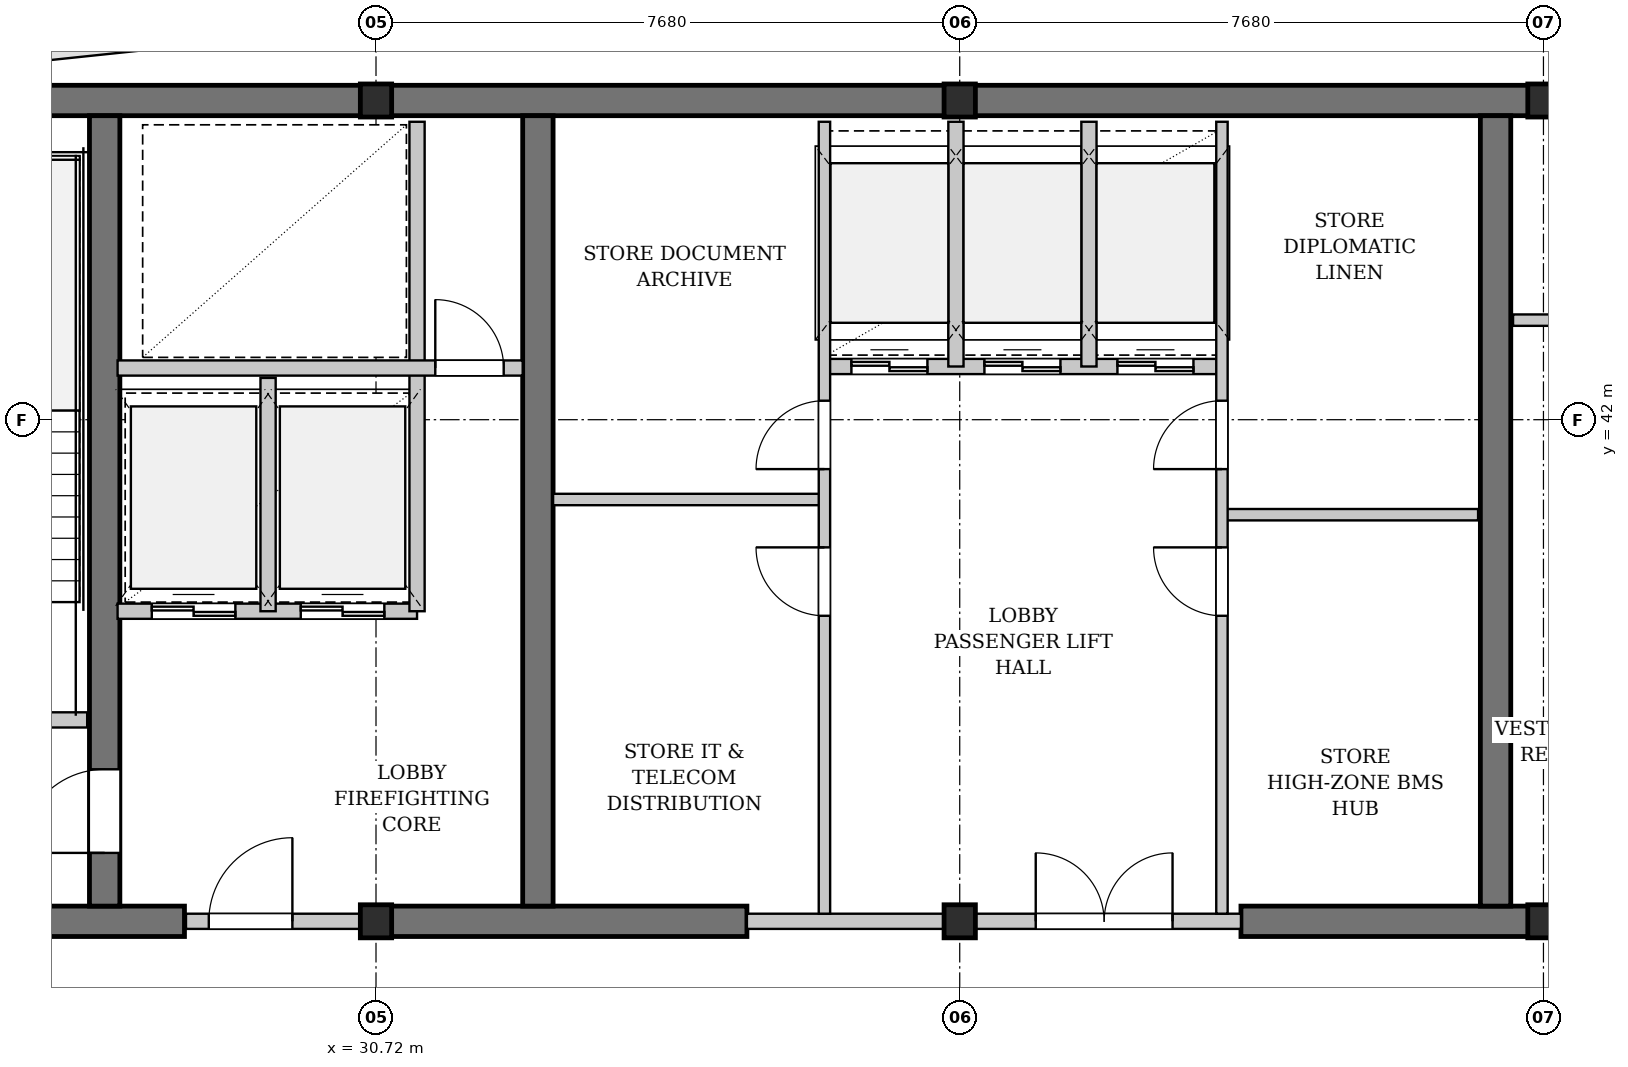
"""IFC4 building model, lengths in metres.
Left out: names, types, materials, properties, quantities, classifications, styles, units other than length and angle.
Written with IfcOpenShell. Run it as: python <this file> out.ifc"""

import sys

from ifc_helpers import new_model, si_unit, direction, frame, frame_2d, origin, origin_2d, place, context, subcontext, project, spatial, rectangle, i_section, extrude, element, fill, save


model = new_model("IFC4")
c1 = context("Model", 3, precision=1e-05, world=origin(), true_north=direction((0.0, 1.0)))
c2 = subcontext(c1, "Body", "Model", "MODEL_VIEW")
j1 = project(units=[si_unit("LENGTHUNIT", "METRE"), si_unit("PLANEANGLEUNIT", "RADIAN")], contexts=[c1])
p1 = place(None, origin())
s1 = spatial("IfcSite", under=j1, at=p1, CompositionType="ELEMENT")
p2 = place(p1, origin())
s2 = spatial("IfcBuilding", under=s1, at=p2, CompositionType="ELEMENT")
p3 = place(p2, frame((0.0, 0.0, 221.0)))
s3 = spatial("IfcBuildingStorey", under=s2, at=p3, CompositionType="ELEMENT", Elevation=221.0)
p4 = place(p3, frame((22.84, 46.2, 0.0), z_axis=(0.0, 0.0, 1.0), x_axis=(1.0, 0.0, 0.0)))
e1 = element("IfcWall", 1, at=p4, inside=s3, PredefinedType="SHEAR", context=c2, shape_type="SweptSolid", body=[
    extrude(rectangle(XDim=31.12, YDim=0.4, at=frame_2d((15.56, 0.0))), origin(), (0.0, 0.0, 1.0), 3.08),
])
p5 = place(p3, frame((22.84, 35.4, 0.0), z_axis=(0.0, 0.0, 1.0), x_axis=(1.0, 0.0, 0.0)))
e2 = element("IfcWall", 2, at=p5, inside=s3, PredefinedType="SHEAR", context=c2, shape_type="SweptSolid", body=[
    extrude(rectangle(XDim=5.36, YDim=0.4, at=frame_2d((2.68, 0.0))), origin(), (0.0, 0.0, 1.0), 3.08),
])
p6 = place(p3, frame((30.72, 35.4, 0.0), z_axis=(0.0, 0.0, 1.0), x_axis=(1.0, 0.0, 0.0)))
e3 = element("IfcWall", 3, at=p6, inside=s3, PredefinedType="SHEAR", context=c2, shape_type="SweptSolid", body=[
    extrude(rectangle(XDim=4.88, YDim=0.4, at=frame_2d((2.44, 0.0))), origin(), (0.0, 0.0, 1.0), 3.08),
])
p7 = place(p3, frame((42.1, 35.4, 0.0), z_axis=(0.0, 0.0, 1.0), x_axis=(1.0, 0.0, 0.0)))
e4 = element("IfcWall", 4, at=p7, inside=s3, PredefinedType="SHEAR", context=c2, shape_type="SweptSolid", body=[
    extrude(rectangle(XDim=8.05, YDim=0.4, at=frame_2d((4.025, 0.0))), origin(), (0.0, 0.0, 1.0), 3.08),
])
p8 = place(p7, frame((4.85, 0.0, 0.0)))
e5 = element("IfcOpeningElement", 5, at=p8, cuts=e4, PredefinedType="OPENING", context=c2, shape_type="SweptSolid", body=[
    extrude(rectangle(XDim=0.9, YDim=2.15, at=frame_2d((0.45, 1.075))), frame((0.0, 0.21, 0.0), z_axis=(0.0, -1.0, 0.0), x_axis=(1.0, 0.0, 0.0)), (0.0, 0.0, 1.0), 0.42),
])
p9 = place(p3, frame((27.15, 35.6, 0.0), z_axis=(0.0, 0.0, 1.0), x_axis=(0.0, 1.0, 0.0)))
e6 = element("IfcWall", 6, at=p9, inside=s3, PredefinedType="SHEAR", context=c2, shape_type="SweptSolid", body=[
    extrude(rectangle(XDim=10.4, YDim=0.4, at=frame_2d((5.2, 0.0))), origin(), (0.0, 0.0, 1.0), 3.08),
])
p10 = place(p9, frame((0.7, 0.0, 0.0)))
e7 = element("IfcOpeningElement", 7, at=p10, cuts=e6, PredefinedType="OPENING", context=c2, shape_type="SweptSolid", body=[
    extrude(rectangle(XDim=1.1, YDim=2.15, at=frame_2d((0.55, 1.075))), frame((0.0, 0.21, 0.0), z_axis=(0.0, -1.0, 0.0), x_axis=(1.0, 0.0, 0.0)), (0.0, 0.0, 1.0), 0.42),
])
for number, where, z_axis, x_axis in (
    (8, (32.85, 35.6, 0.0), (0.0, 0.0, 1.0), (0.0, 1.0, 0.0)),
    (9, (45.45, 35.6, 0.0), (0.0, 0.0, 1.0), (0.0, 1.0, 0.0)),
):
    element("IfcWall", number, at=place(p3, frame(where, z_axis=z_axis, x_axis=x_axis)), inside=s3, PredefinedType="SHEAR", context=c2, shape_type="SweptSolid", body=[
        extrude(rectangle(XDim=10.4, YDim=0.4, at=frame_2d((5.2, 0.0))), origin(), (0.0, 0.0, 1.0), 3.08),
    ])
for number, where, z_axis, x_axis in (
    (10, (30.72, 35.4, 0.0), (0.0, 0.0, 1.0), (1.0, 0.0, 0.0)),
    (11, (30.72, 46.2, 0.0), (0.0, 0.0, 1.0), (1.0, 0.0, 0.0)),
    (12, (38.4, 35.4, 0.0), (0.0, 0.0, 1.0), (1.0, 0.0, 0.0)),
    (13, (38.4, 46.2, 0.0), (0.0, 0.0, 1.0), (1.0, 0.0, 0.0)),
    (14, (46.08, 35.4, 0.0), (0.0, 0.0, 1.0), (1.0, 0.0, 0.0)),
    (15, (46.08, 46.2, 0.0), (0.0, 0.0, 1.0), (1.0, 0.0, 0.0)),
):
    element("IfcColumn", number, at=place(p3, frame(where, z_axis=z_axis, x_axis=x_axis)), inside=s3, PredefinedType="COLUMN", context=c2, shape_type="SweptSolid", body=[
        extrude(i_section(OverallWidth=0.412, OverallDepth=0.435, WebThickness=0.036, FlangeThickness=0.058, FilletRadius=0.015, at=origin_2d()), origin(), (0.0, 0.0, 1.0), 3.3),
    ])
p11 = place(p3, frame((23.3, 38.05, 0.0), z_axis=(0.0, 0.0, 1.0), x_axis=(1.0, 0.0, 0.0)))
e16 = element("IfcWall", 16, at=p11, inside=s3, PredefinedType="PARTITIONING", context=c2, shape_type="SweptSolid", body=[
    extrude(rectangle(XDim=3.62, YDim=0.2, at=frame_2d((1.81, 0.0))), origin(), (0.0, 0.0, 1.0), 3.08),
])
p12 = place(p11, frame((1.26, 0.0, 0.0)))
e17 = element("IfcOpeningElement", 17, at=p12, cuts=e16, PredefinedType="OPENING", context=c2, shape_type="SweptSolid", body=[
    extrude(rectangle(XDim=1.1, YDim=2.15, at=frame_2d((0.55, 1.075))), frame((0.0, 0.11, 0.0), z_axis=(0.0, -1.0, 0.0), x_axis=(1.0, 0.0, 0.0)), (0.0, 0.0, 1.0), 0.22),
])
p13 = place(p3, frame((28.22, 35.4, 0.0), z_axis=(0.0, 0.0, 1.0), x_axis=(1.0, 0.0, 0.0)))
e18 = element("IfcWall", 18, at=p13, inside=s3, PredefinedType="PARTITIONING", context=c2, shape_type="SweptSolid", body=[
    extrude(rectangle(XDim=2.5, YDim=0.2, at=frame_2d((1.25, 0.0))), origin(), (0.0, 0.0, 1.0), 2.313),
])
p14 = place(p13, frame((0.3, 0.0, 0.0)))
e19 = element("IfcOpeningElement", 19, at=p14, cuts=e18, PredefinedType="OPENING", context=c2, shape_type="SweptSolid", body=[
    extrude(rectangle(XDim=1.1, YDim=2.15, at=frame_2d((0.55, 1.075))), frame((0.0, 0.11, 0.0), z_axis=(0.0, -1.0, 0.0), x_axis=(1.0, 0.0, 0.0)), (0.0, 0.0, 1.0), 0.22),
])
p15 = place(p3, frame((27.32, 39.48, 0.0), z_axis=(0.0, 0.0, 1.0), x_axis=(1.0, 0.0, 0.0)))
e20 = element("IfcWall", 20, at=p15, inside=s3, PredefinedType="PARTITIONING", context=c2, shape_type="SweptSolid", body=[
    extrude(rectangle(XDim=3.94, YDim=0.2, at=frame_2d((1.97, 0.0))), origin(), (0.0, 0.0, 1.0), 3.08),
])
p16 = place(p15, frame((0.45, 0.0, 0.0)))
e21 = element("IfcOpeningElement", 21, at=p16, cuts=e20, PredefinedType="OPENING", context=c2, shape_type="SweptSolid", body=[
    extrude(rectangle(XDim=1.1, YDim=2.2, at=frame_2d((0.55, 1.1))), frame((0.0, 0.11, 0.0), z_axis=(0.0, -1.0, 0.0), x_axis=(1.0, 0.0, 0.0)), (0.0, 0.0, 1.0), 0.22),
])
p17 = place(p15, frame((2.41, 0.0, 0.0)))
e22 = element("IfcOpeningElement", 22, at=p17, cuts=e20, PredefinedType="OPENING", context=c2, shape_type="SweptSolid", body=[
    extrude(rectangle(XDim=1.1, YDim=2.2, at=frame_2d((0.55, 1.1))), frame((0.0, 0.11, 0.0), z_axis=(0.0, -1.0, 0.0), x_axis=(1.0, 0.0, 0.0)), (0.0, 0.0, 1.0), 0.22),
])
p18 = place(p3, frame((29.3, 39.48, 0.0), z_axis=(0.0, 0.0, 1.0), x_axis=(0.0, 1.0, 0.0)))
e23 = element("IfcWall", 23, at=p18, inside=s3, PredefinedType="PARTITIONING", context=c2, shape_type="SweptSolid", body=[
    extrude(rectangle(XDim=3.07, YDim=0.2, at=frame_2d((1.535, 0.0))), origin(), (0.0, 0.0, 1.0), 3.08),
])
p19 = place(p3, frame((31.26, 39.48, 0.0), z_axis=(0.0, 0.0, 1.0), x_axis=(0.0, 1.0, 0.0)))
e24 = element("IfcWall", 24, at=p19, inside=s3, PredefinedType="PARTITIONING", context=c2, shape_type="SweptSolid", body=[
    extrude(rectangle(XDim=6.44, YDim=0.2, at=frame_2d((3.22, 0.0))), origin(), (0.0, 0.0, 1.0), 3.08),
])
p20 = place(p3, frame((27.32, 42.68, 0.0), z_axis=(0.0, 0.0, 1.0), x_axis=(1.0, 0.0, 0.0)))
e25 = element("IfcWall", 25, at=p20, inside=s3, PredefinedType="PARTITIONING", context=c2, shape_type="SweptSolid", body=[
    extrude(rectangle(XDim=5.33, YDim=0.2, at=frame_2d((2.665, 0.0))), origin(), (0.0, 0.0, 1.0), 3.08),
])
p21 = place(p20, frame((4.18, 0.0, 0.0)))
e26 = element("IfcOpeningElement", 26, at=p21, cuts=e25, PredefinedType="OPENING", context=c2, shape_type="SweptSolid", body=[
    extrude(rectangle(XDim=0.9, YDim=2.15, at=frame_2d((0.45, 1.075))), frame((0.0, 0.11, 0.0), z_axis=(0.0, -1.0, 0.0), x_axis=(1.0, 0.0, 0.0)), (0.0, 0.0, 1.0), 0.22),
])
p22 = place(p3, frame((35.6, 35.4, 0.0), z_axis=(0.0, 0.0, 1.0), x_axis=(1.0, 0.0, 0.0)))
e27 = element("IfcWall", 27, at=p22, inside=s3, PredefinedType="PARTITIONING", context=c2, shape_type="SweptSolid", body=[
    extrude(rectangle(XDim=6.5, YDim=0.2, at=frame_2d((3.25, 0.0))), origin(), (0.0, 0.0, 1.0), 2.313),
])
p23 = place(p22, frame((3.8, 0.0, 0.0)))
e28 = element("IfcOpeningElement", 28, at=p23, cuts=e27, PredefinedType="OPENING", context=c2, shape_type="SweptSolid", body=[
    extrude(rectangle(XDim=1.8, YDim=2.3, at=frame_2d((0.9, 1.15))), frame((0.0, 0.11, 0.0), z_axis=(0.0, -1.0, 0.0), x_axis=(1.0, 0.0, 0.0)), (0.0, 0.0, 1.0), 0.22),
])
p24 = place(p3, frame((36.6, 42.7, 0.0), z_axis=(0.0, 0.0, 1.0), x_axis=(1.0, 0.0, 0.0)))
e29 = element("IfcWall", 29, at=p24, inside=s3, PredefinedType="PARTITIONING", context=c2, shape_type="SweptSolid", body=[
    extrude(rectangle(XDim=5.25, YDim=0.2, at=frame_2d((2.625, 0.0))), origin(), (0.0, 0.0, 1.0), 3.08),
])
p25 = place(p24, frame((0.375, 0.0, 0.0)))
e30 = element("IfcOpeningElement", 30, at=p25, cuts=e29, PredefinedType="OPENING", context=c2, shape_type="SweptSolid", body=[
    extrude(rectangle(XDim=1.0, YDim=2.2, at=frame_2d((0.5, 1.1))), frame((0.0, 0.11, 0.0), z_axis=(0.0, -1.0, 0.0), x_axis=(1.0, 0.0, 0.0)), (0.0, 0.0, 1.0), 0.22),
])
p26 = place(p24, frame((2.125, 0.0, 0.0)))
e31 = element("IfcOpeningElement", 31, at=p26, cuts=e29, PredefinedType="OPENING", context=c2, shape_type="SweptSolid", body=[
    extrude(rectangle(XDim=1.0, YDim=2.2, at=frame_2d((0.5, 1.1))), frame((0.0, 0.11, 0.0), z_axis=(0.0, -1.0, 0.0), x_axis=(1.0, 0.0, 0.0)), (0.0, 0.0, 1.0), 0.22),
])
p27 = place(p24, frame((3.875, 0.0, 0.0)))
e32 = element("IfcOpeningElement", 32, at=p27, cuts=e29, PredefinedType="OPENING", context=c2, shape_type="SweptSolid", body=[
    extrude(rectangle(XDim=1.0, YDim=2.2, at=frame_2d((0.5, 1.1))), frame((0.0, 0.11, 0.0), z_axis=(0.0, -1.0, 0.0), x_axis=(1.0, 0.0, 0.0)), (0.0, 0.0, 1.0), 0.22),
])
p28 = place(p3, frame((38.35, 42.7, 0.0), z_axis=(0.0, 0.0, 1.0), x_axis=(0.0, 1.0, 0.0)))
e33 = element("IfcWall", 33, at=p28, inside=s3, PredefinedType="PARTITIONING", context=c2, shape_type="SweptSolid", body=[
    extrude(rectangle(XDim=3.22, YDim=0.2, at=frame_2d((1.61, 0.0))), origin(), (0.0, 0.0, 1.0), 2.313),
])
p29 = place(p3, frame((40.1, 42.7, 0.0), z_axis=(0.0, 0.0, 1.0), x_axis=(0.0, 1.0, 0.0)))
e34 = element("IfcWall", 34, at=p29, inside=s3, PredefinedType="PARTITIONING", context=c2, shape_type="SweptSolid", body=[
    extrude(rectangle(XDim=3.22, YDim=0.2, at=frame_2d((1.61, 0.0))), origin(), (0.0, 0.0, 1.0), 3.08),
])
p30 = place(p3, frame((33.05, 40.95, 0.0), z_axis=(0.0, 0.0, 1.0), x_axis=(1.0, 0.0, 0.0)))
e35 = element("IfcWall", 35, at=p30, inside=s3, PredefinedType="PARTITIONING", context=c2, shape_type="SweptSolid", body=[
    extrude(rectangle(XDim=3.57, YDim=0.15, at=frame_2d((1.785, 0.0))), origin(), (0.0, 0.0, 1.0), 3.08),
])
p31 = place(p3, frame((36.62, 35.5, 0.0), z_axis=(0.0, 0.0, 1.0), x_axis=(0.0, 1.0, 0.0)))
e36 = element("IfcWall", 36, at=p31, inside=s3, PredefinedType="PARTITIONING", context=c2, shape_type="SweptSolid", body=[
    extrude(rectangle(XDim=10.42, YDim=0.15, at=frame_2d((5.21, 0.0))), origin(), (0.0, 0.0, 1.0), 3.08),
])
p32 = place(p31, frame((3.92, 0.0, 0.0)))
e37 = element("IfcOpeningElement", 37, at=p32, cuts=e36, PredefinedType="OPENING", context=c2, shape_type="SweptSolid", body=[
    extrude(rectangle(XDim=0.9, YDim=2.15, at=frame_2d((0.45, 1.075))), frame((0.0, 0.085, 0.0), z_axis=(0.0, -1.0, 0.0), x_axis=(1.0, 0.0, 0.0)), (0.0, 0.0, 1.0), 0.17),
])
p33 = place(p31, frame((5.85, 0.0, 0.0)))
e38 = element("IfcOpeningElement", 38, at=p33, cuts=e36, PredefinedType="OPENING", context=c2, shape_type="SweptSolid", body=[
    extrude(rectangle(XDim=0.9, YDim=2.15, at=frame_2d((0.45, 1.075))), frame((0.0, 0.085, 0.0), z_axis=(0.0, -1.0, 0.0), x_axis=(1.0, 0.0, 0.0)), (0.0, 0.0, 1.0), 0.17),
])
p34 = place(p3, frame((41.85, 40.75, 0.0), z_axis=(0.0, 0.0, 1.0), x_axis=(1.0, 0.0, 0.0)))
e39 = element("IfcWall", 39, at=p34, inside=s3, PredefinedType="PARTITIONING", context=c2, shape_type="SweptSolid", body=[
    extrude(rectangle(XDim=3.37, YDim=0.15, at=frame_2d((1.685, 0.0))), origin(), (0.0, 0.0, 1.0), 3.08),
])
p35 = place(p3, frame((41.85, 35.5, 0.0), z_axis=(0.0, 0.0, 1.0), x_axis=(0.0, 1.0, 0.0)))
e40 = element("IfcWall", 40, at=p35, inside=s3, PredefinedType="PARTITIONING", context=c2, shape_type="SweptSolid", body=[
    extrude(rectangle(XDim=10.42, YDim=0.15, at=frame_2d((5.21, 0.0))), origin(), (0.0, 0.0, 1.0), 3.08),
])
p36 = place(p35, frame((3.92, 0.0, 0.0)))
e41 = element("IfcOpeningElement", 41, at=p36, cuts=e40, PredefinedType="OPENING", context=c2, shape_type="SweptSolid", body=[
    extrude(rectangle(XDim=0.9, YDim=2.15, at=frame_2d((0.45, 1.075))), frame((0.0, 0.085, 0.0), z_axis=(0.0, -1.0, 0.0), x_axis=(1.0, 0.0, 0.0)), (0.0, 0.0, 1.0), 0.17),
])
p37 = place(p35, frame((5.85, 0.0, 0.0)))
e42 = element("IfcOpeningElement", 42, at=p37, cuts=e40, PredefinedType="OPENING", context=c2, shape_type="SweptSolid", body=[
    extrude(rectangle(XDim=0.9, YDim=2.15, at=frame_2d((0.45, 1.075))), frame((0.0, 0.085, 0.0), z_axis=(0.0, -1.0, 0.0), x_axis=(1.0, 0.0, 0.0)), (0.0, 0.0, 1.0), 0.17),
])
p38 = place(p3, frame((45.68, 43.31, 0.0), z_axis=(0.0, 0.0, 1.0), x_axis=(1.0, 0.0, 0.0)))
e43 = element("IfcWall", 43, at=p38, inside=s3, PredefinedType="PARTITIONING", context=c2, shape_type="SweptSolid", body=[
    extrude(rectangle(XDim=2.2, YDim=0.15, at=frame_2d((1.1, 0.0))), origin(), (0.0, 0.0, 1.0), 3.08),
])
p39 = place(p38, frame((0.65, 0.0, 0.0)))
e44 = element("IfcOpeningElement", 44, at=p39, cuts=e43, PredefinedType="OPENING", context=c2, shape_type="SweptSolid", body=[
    extrude(rectangle(XDim=0.9, YDim=2.15, at=frame_2d((0.45, 1.075))), frame((0.0, 0.085, 0.0), z_axis=(0.0, -1.0, 0.0), x_axis=(1.0, 0.0, 0.0)), (0.0, 0.0, 1.0), 0.17),
])
p40 = place(p14, origin())
e45 = element("IfcDoor", 45, at=p40, inside=s3, OperationType="SINGLE_SWING_RIGHT", PredefinedType="DOOR", context=c2, shape_type="SweptSolid", body=[
    extrude(rectangle(XDim=1.1, YDim=2.15, at=frame_2d((0.55, 1.075))), frame((0.0, 0.025, 0.0), z_axis=(0.0, -1.0, 0.0), x_axis=(1.0, 0.0, 0.0)), (0.0, 0.0, 1.0), 0.05),
])
fill(e19, e45)
p41 = place(p16, origin())
e46 = element("IfcDoor", 46, at=p41, inside=s3, OperationType="DOUBLE_DOOR_SLIDING", PredefinedType="DOOR", context=c2, shape_type="SweptSolid", body=[
    extrude(rectangle(XDim=1.1, YDim=2.2, at=frame_2d((0.55, 1.1))), frame((0.0, 0.025, 0.0), z_axis=(0.0, -1.0, 0.0), x_axis=(1.0, 0.0, 0.0)), (0.0, 0.0, 1.0), 0.05),
])
fill(e21, e46)
p42 = place(p17, origin())
e47 = element("IfcDoor", 47, at=p42, inside=s3, OperationType="DOUBLE_DOOR_SLIDING", PredefinedType="DOOR", context=c2, shape_type="SweptSolid", body=[
    extrude(rectangle(XDim=1.1, YDim=2.2, at=frame_2d((0.55, 1.1))), frame((0.0, 0.025, 0.0), z_axis=(0.0, -1.0, 0.0), x_axis=(1.0, 0.0, 0.0)), (0.0, 0.0, 1.0), 0.05),
])
fill(e22, e47)
p43 = place(p21, origin())
e48 = element("IfcDoor", 48, at=p43, inside=s3, OperationType="SINGLE_SWING_LEFT", PredefinedType="DOOR", context=c2, shape_type="SweptSolid", body=[
    extrude(rectangle(XDim=0.9, YDim=2.15, at=frame_2d((0.45, 1.075))), frame((0.0, 0.025, 0.0), z_axis=(0.0, -1.0, 0.0), x_axis=(1.0, 0.0, 0.0)), (0.0, 0.0, 1.0), 0.05),
])
fill(e26, e48)
p44 = place(p23, origin())
e49 = element("IfcDoor", 49, at=p44, inside=s3, OperationType="DOUBLE_DOOR_SINGLE_SWING", PredefinedType="DOOR", context=c2, shape_type="SweptSolid", body=[
    extrude(rectangle(XDim=1.8, YDim=2.3, at=frame_2d((0.9, 1.15))), frame((0.0, 0.025, 0.0), z_axis=(0.0, -1.0, 0.0), x_axis=(1.0, 0.0, 0.0)), (0.0, 0.0, 1.0), 0.05),
])
fill(e28, e49)
p45 = place(p25, origin())
e50 = element("IfcDoor", 50, at=p45, inside=s3, OperationType="DOUBLE_DOOR_SLIDING", PredefinedType="DOOR", context=c2, shape_type="SweptSolid", body=[
    extrude(rectangle(XDim=1.0, YDim=2.2, at=frame_2d((0.5, 1.1))), frame((0.0, 0.025, 0.0), z_axis=(0.0, -1.0, 0.0), x_axis=(1.0, 0.0, 0.0)), (0.0, 0.0, 1.0), 0.05),
])
fill(e30, e50)
p46 = place(p26, origin())
e51 = element("IfcDoor", 51, at=p46, inside=s3, OperationType="DOUBLE_DOOR_SLIDING", PredefinedType="DOOR", context=c2, shape_type="SweptSolid", body=[
    extrude(rectangle(XDim=1.0, YDim=2.2, at=frame_2d((0.5, 1.1))), frame((0.0, 0.025, 0.0), z_axis=(0.0, -1.0, 0.0), x_axis=(1.0, 0.0, 0.0)), (0.0, 0.0, 1.0), 0.05),
])
fill(e31, e51)
p47 = place(p27, origin())
e52 = element("IfcDoor", 52, at=p47, inside=s3, OperationType="DOUBLE_DOOR_SLIDING", PredefinedType="DOOR", context=c2, shape_type="SweptSolid", body=[
    extrude(rectangle(XDim=1.0, YDim=2.2, at=frame_2d((0.5, 1.1))), frame((0.0, 0.025, 0.0), z_axis=(0.0, -1.0, 0.0), x_axis=(1.0, 0.0, 0.0)), (0.0, 0.0, 1.0), 0.05),
])
fill(e32, e52)
p48 = place(p32, origin())
e53 = element("IfcDoor", 53, at=p48, inside=s3, OperationType="SINGLE_SWING_RIGHT", PredefinedType="DOOR", context=c2, shape_type="SweptSolid", body=[
    extrude(rectangle(XDim=0.9, YDim=2.15, at=frame_2d((0.45, 1.075))), frame((0.0, 0.025, 0.0), z_axis=(0.0, -1.0, 0.0), x_axis=(1.0, 0.0, 0.0)), (0.0, 0.0, 1.0), 0.05),
])
fill(e37, e53)
p49 = place(p33, origin())
e54 = element("IfcDoor", 54, at=p49, inside=s3, OperationType="SINGLE_SWING_LEFT", PredefinedType="DOOR", context=c2, shape_type="SweptSolid", body=[
    extrude(rectangle(XDim=0.9, YDim=2.15, at=frame_2d((0.45, 1.075))), frame((0.0, 0.025, 0.0), z_axis=(0.0, -1.0, 0.0), x_axis=(1.0, 0.0, 0.0)), (0.0, 0.0, 1.0), 0.05),
])
fill(e38, e54)
p50 = place(p36, origin())
e55 = element("IfcDoor", 55, at=p50, inside=s3, OperationType="SINGLE_SWING_RIGHT", PredefinedType="DOOR", context=c2, shape_type="SweptSolid", body=[
    extrude(rectangle(XDim=0.9, YDim=2.15, at=frame_2d((0.45, 1.075))), frame((0.0, 0.025, 0.0), z_axis=(0.0, -1.0, 0.0), x_axis=(1.0, 0.0, 0.0)), (0.0, 0.0, 1.0), 0.05),
])
fill(e41, e55)
p51 = place(p37, origin())
e56 = element("IfcDoor", 56, at=p51, inside=s3, OperationType="SINGLE_SWING_LEFT", PredefinedType="DOOR", context=c2, shape_type="SweptSolid", body=[
    extrude(rectangle(XDim=0.9, YDim=2.15, at=frame_2d((0.45, 1.075))), frame((0.0, 0.025, 0.0), z_axis=(0.0, -1.0, 0.0), x_axis=(1.0, 0.0, 0.0)), (0.0, 0.0, 1.0), 0.05),
])
fill(e42, e56)
p52 = place(p10, origin())
e57 = element("IfcDoor", 57, at=p52, inside=s3, OperationType="SINGLE_SWING_LEFT", PredefinedType="DOOR", context=c2, shape_type="SweptSolid", body=[
    extrude(rectangle(XDim=1.1, YDim=2.15, at=frame_2d((0.55, 1.075))), frame((0.0, 0.025, 0.0), z_axis=(0.0, -1.0, 0.0), x_axis=(1.0, 0.0, 0.0)), (0.0, 0.0, 1.0), 0.05),
])
fill(e7, e57)
save(model, sys.argv[1])
